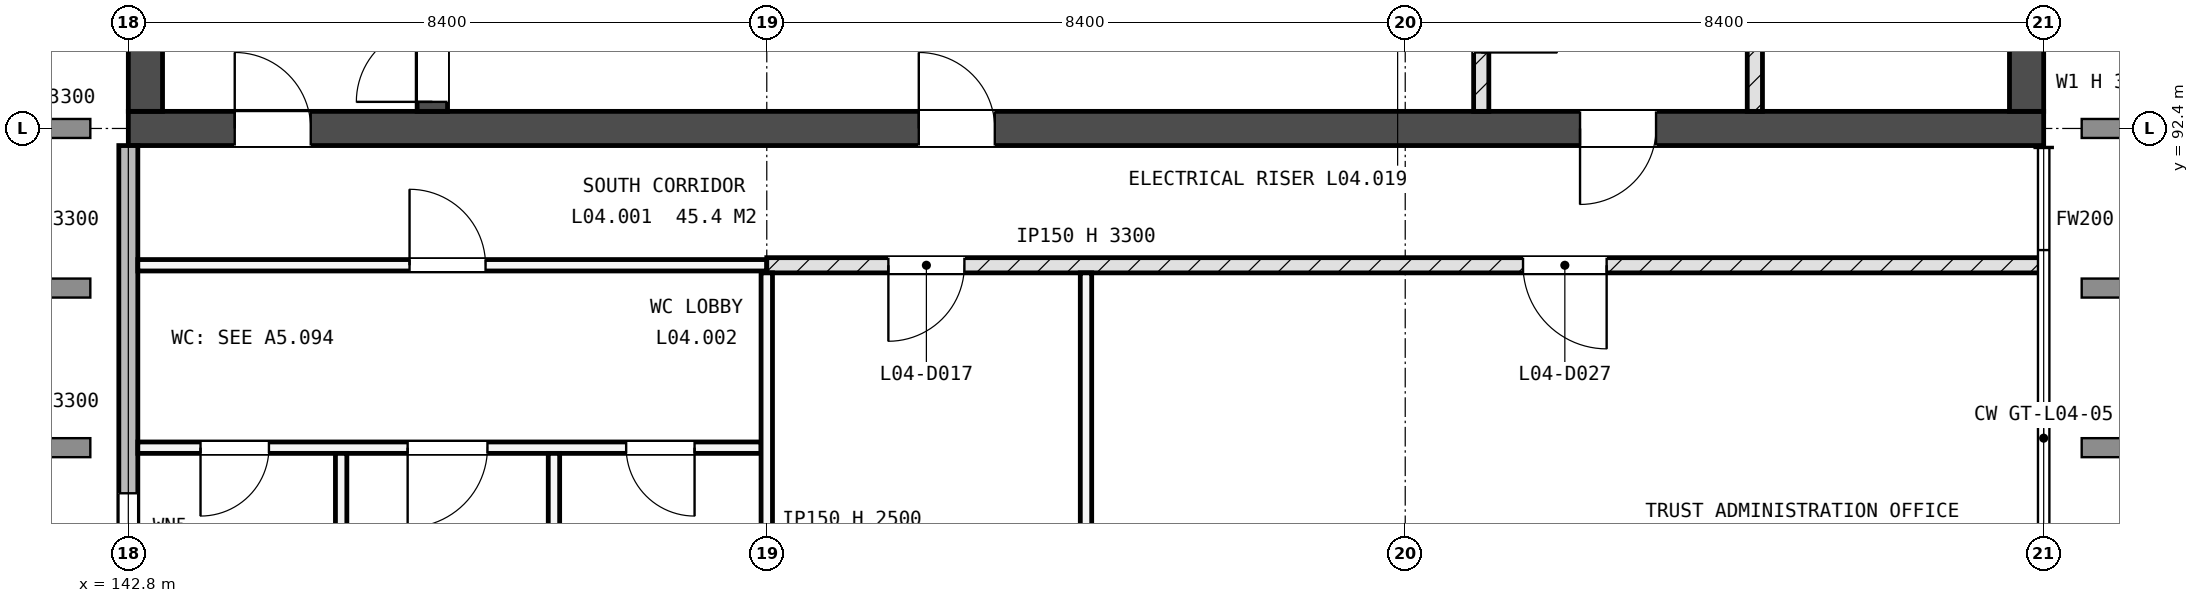
"""IFC4 building model, lengths in metres.
Left out: names, types, materials, properties, quantities, classifications, styles, units other than length and angle.
Written with IfcOpenShell. Run it as: python <this file> out.ifc"""

import sys

from ifc_helpers import new_model, si_unit, direction, frame, frame_2d, origin, place, context, subcontext, project, spatial, rectangle, extrude, element, fill, save


model = new_model("IFC4")
c1 = context("Model", 3, precision=1e-05, world=origin(), true_north=direction((0.0, 1.0)))
c2 = subcontext(c1, "Body", "Model", "MODEL_VIEW")
j1 = project(units=[si_unit("LENGTHUNIT", "METRE"), si_unit("PLANEANGLEUNIT", "RADIAN")], contexts=[c1])
p1 = place(None, origin())
s1 = spatial("IfcSite", under=j1, at=p1, CompositionType="ELEMENT")
p2 = place(p1, origin())
s2 = spatial("IfcBuilding", under=s1, at=p2, CompositionType="ELEMENT")
p3 = place(p2, frame((0.0, 0.0, 18.0)))
s3 = spatial("IfcBuildingStorey", under=s2, at=p3, CompositionType="ELEMENT", Elevation=18.0)
p4 = place(p3, frame((142.8, 92.4, -0.25), z_axis=(0.0, 0.0, 1.0), x_axis=(1.0, 0.0, 0.0)))
e1 = element("IfcWall", 1, at=p4, inside=s3, PredefinedType="SHEAR", context=c2, shape_type="SweptSolid", body=[
    extrude(rectangle(XDim=25.2, YDim=0.45, at=frame_2d((12.6, 0.0))), origin(), (0.0, 0.0, 1.0), 3.6),
])
p5 = place(p4, frame((1.4, 0.0, 0.25)))
e2 = element("IfcOpeningElement", 2, at=p5, cuts=e1, PredefinedType="OPENING", context=c2, shape_type="SweptSolid", body=[
    extrude(rectangle(XDim=1.0, YDim=2.1, at=frame_2d((0.5, 1.05))), frame((0.0, 0.235, 0.0), z_axis=(0.0, -1.0, 0.0), x_axis=(1.0, 0.0, 0.0)), (0.0, 0.0, 1.0), 0.47),
])
p6 = place(p4, frame((19.1, 0.0, 0.25)))
e3 = element("IfcOpeningElement", 3, at=p6, cuts=e1, PredefinedType="OPENING", context=c2, shape_type="SweptSolid", body=[
    extrude(rectangle(XDim=1.0, YDim=2.1, at=frame_2d((0.5, 1.05))), frame((0.0, 0.235, 0.0), z_axis=(0.0, -1.0, 0.0), x_axis=(1.0, 0.0, 0.0)), (0.0, 0.0, 1.0), 0.47),
])
p7 = place(p4, frame((10.4, 0.0, 0.25)))
e4 = element("IfcOpeningElement", 4, at=p7, cuts=e1, PredefinedType="OPENING", context=c2, shape_type="SweptSolid", body=[
    extrude(rectangle(XDim=1.0, YDim=2.1, at=frame_2d((0.5, 1.05))), frame((0.0, 0.235, 0.0), z_axis=(0.0, -1.0, 0.0), x_axis=(1.0, 0.0, 0.0)), (0.0, 0.0, 1.0), 0.47),
])
p8 = place(p3, frame((143.025, 92.625, -0.25), z_axis=(0.0, 0.0, 1.0), x_axis=(0.0, 1.0, 0.0)))
e5 = element("IfcWall", 5, at=p8, inside=s3, PredefinedType="SHEAR", context=c2, shape_type="SweptSolid", body=[
    extrude(rectangle(XDim=16.35, YDim=0.45, at=frame_2d((8.175, 0.0))), origin(), (0.0, 0.0, 1.0), 3.6),
])
p9 = place(p8, frame((2.975, 0.0, 1.85)))
e6 = element("IfcOpeningElement", 6, at=p9, cuts=e5, PredefinedType="OPENING", context=c2, shape_type="SweptSolid", body=[
    extrude(rectangle(XDim=1.2, YDim=0.9, at=frame_2d((0.6, 0.45))), frame((0.0, 0.235, 0.0), z_axis=(0.0, -1.0, 0.0), x_axis=(1.0, 0.0, 0.0)), (0.0, 0.0, 1.0), 0.47),
])
p10 = place(p3, frame((167.775, 92.625, -0.25), z_axis=(0.0, 0.0, 1.0), x_axis=(0.0, 1.0, 0.0)))
e7 = element("IfcWall", 7, at=p10, inside=s3, PredefinedType="SHEAR", context=c2, shape_type="SweptSolid", body=[
    extrude(rectangle(XDim=16.35, YDim=0.45, at=frame_2d((8.175, 0.0))), origin(), (0.0, 0.0, 1.0), 3.6),
])
p11 = place(p10, frame((12.175, 0.0, 1.85)))
e8 = element("IfcOpeningElement", 8, at=p11, cuts=e7, PredefinedType="OPENING", context=c2, shape_type="SweptSolid", body=[
    extrude(rectangle(XDim=1.2, YDim=0.9, at=frame_2d((0.6, 0.45))), frame((0.0, 0.235, 0.0), z_axis=(0.0, -1.0, 0.0), x_axis=(1.0, 0.0, 0.0)), (0.0, 0.0, 1.0), 0.47),
])
p12 = place(p3, frame((146.8, 92.625, -0.25), z_axis=(0.0, 0.0, 1.0), x_axis=(0.0, 1.0, 0.0)))
e9 = element("IfcWall", 9, at=p12, inside=s3, PredefinedType="SHEAR", context=c2, shape_type="SweptSolid", body=[
    extrude(rectangle(XDim=7.5, YDim=0.4, at=frame_2d((3.75, 0.0))), origin(), (0.0, 0.0, 1.0), 3.6),
])
p13 = place(p12, frame((0.125, 0.0, 0.25)))
e10 = element("IfcOpeningElement", 10, at=p13, cuts=e9, PredefinedType="OPENING", context=c2, shape_type="SweptSolid", body=[
    extrude(rectangle(XDim=1.0, YDim=2.1, at=frame_2d((0.5, 1.05))), frame((0.0, 0.21, 0.0), z_axis=(0.0, -1.0, 0.0), x_axis=(1.0, 0.0, 0.0)), (0.0, 0.0, 1.0), 0.42),
])
p14 = place(p3, frame((142.8, 84.5, 0.0), z_axis=(0.0, 0.0, 1.0), x_axis=(0.0, 1.0, 0.0)))
e11 = element("IfcWall", 11, at=p14, inside=s3, PredefinedType="STANDARD", context=c2, shape_type="SweptSolid", body=[
    extrude(rectangle(XDim=7.675, YDim=0.25, at=frame_2d((3.837, 0.0))), origin(), (0.0, 0.0, 1.0), 3.3),
])
p15 = place(p14, frame((2.2, 0.0, 2.1)))
e12 = element("IfcOpeningElement", 12, at=p15, cuts=e11, PredefinedType="OPENING", context=c2, shape_type="SweptSolid", body=[
    extrude(rectangle(XDim=0.9, YDim=0.6, at=frame_2d((0.45, 0.3))), frame((0.0, 0.135, 0.0), z_axis=(0.0, -1.0, 0.0), x_axis=(1.0, 0.0, 0.0)), (0.0, 0.0, 1.0), 0.27),
])
p16 = place(p3, frame((142.925, 88.2, 0.0), z_axis=(0.0, 0.0, 1.0), x_axis=(1.0, 0.0, 0.0)))
e13 = element("IfcWall", 13, at=p16, inside=s3, PredefinedType="PARTITIONING", context=c2, shape_type="SweptSolid", body=[
    extrude(rectangle(XDim=8.2, YDim=0.15, at=frame_2d((4.1, 0.0))), origin(), (0.0, 0.0, 1.0), 3.3),
])
p17 = place(p16, frame((0.825, 0.0, 0.0)))
e14 = element("IfcOpeningElement", 14, at=p17, cuts=e13, PredefinedType="OPENING", context=c2, shape_type="SweptSolid", body=[
    extrude(rectangle(XDim=0.9, YDim=2.1, at=frame_2d((0.45, 1.05))), frame((0.0, 0.085, 0.0), z_axis=(0.0, -1.0, 0.0), x_axis=(1.0, 0.0, 0.0)), (0.0, 0.0, 1.0), 0.17),
])
p18 = place(p16, frame((3.55, 0.0, 0.0)))
e15 = element("IfcOpeningElement", 15, at=p18, cuts=e13, PredefinedType="OPENING", context=c2, shape_type="SweptSolid", body=[
    extrude(rectangle(XDim=1.05, YDim=2.25, at=frame_2d((0.525, 1.125))), frame((0.0, 0.085, 0.0), z_axis=(0.0, -1.0, 0.0), x_axis=(1.0, 0.0, 0.0)), (0.0, 0.0, 1.0), 0.17),
])
p19 = place(p16, frame((6.425, 0.0, 0.0)))
e16 = element("IfcOpeningElement", 16, at=p19, cuts=e13, PredefinedType="OPENING", context=c2, shape_type="SweptSolid", body=[
    extrude(rectangle(XDim=0.9, YDim=2.1, at=frame_2d((0.45, 1.05))), frame((0.0, 0.085, 0.0), z_axis=(0.0, -1.0, 0.0), x_axis=(1.0, 0.0, 0.0)), (0.0, 0.0, 1.0), 0.17),
])
p20 = place(p3, frame((142.925, 90.6, 0.0), z_axis=(0.0, 0.0, 1.0), x_axis=(1.0, 0.0, 0.0)))
e17 = element("IfcWall", 17, at=p20, inside=s3, PredefinedType="PARTITIONING", context=c2, shape_type="SweptSolid", body=[
    extrude(rectangle(XDim=8.275, YDim=0.15, at=frame_2d((4.137, 0.0))), origin(), (0.0, 0.0, 1.0), 3.3),
])
p21 = place(p20, frame((3.575, 0.0, 0.0)))
e18 = element("IfcOpeningElement", 18, at=p21, cuts=e17, PredefinedType="OPENING", context=c2, shape_type="SweptSolid", body=[
    extrude(rectangle(XDim=1.0, YDim=2.1, at=frame_2d((0.5, 1.05))), frame((0.0, 0.085, 0.0), z_axis=(0.0, -1.0, 0.0), x_axis=(1.0, 0.0, 0.0)), (0.0, 0.0, 1.0), 0.17),
])
p22 = place(p3, frame((151.2, 90.6, 0.0), z_axis=(0.0, 0.0, 1.0), x_axis=(1.0, 0.0, 0.0)))
e19 = element("IfcWall", 19, at=p22, inside=s3, PredefinedType="SOLIDWALL", context=c2, shape_type="SweptSolid", body=[
    extrude(rectangle(XDim=16.8, YDim=0.2, at=frame_2d((8.4, 0.0))), origin(), (0.0, 0.0, 1.0), 3.3),
])
p23 = place(p22, frame((1.6, 0.0, 0.0)))
e20 = element("IfcOpeningElement", 20, at=p23, cuts=e19, PredefinedType="OPENING", context=c2, shape_type="SweptSolid", body=[
    extrude(rectangle(XDim=1.0, YDim=2.1, at=frame_2d((0.5, 1.05))), frame((0.0, 0.11, 0.0), z_axis=(0.0, -1.0, 0.0), x_axis=(1.0, 0.0, 0.0)), (0.0, 0.0, 1.0), 0.22),
])
p24 = place(p22, frame((9.95, 0.0, 0.0)))
e21 = element("IfcOpeningElement", 21, at=p24, cuts=e19, PredefinedType="OPENING", context=c2, shape_type="SweptSolid", body=[
    extrude(rectangle(XDim=1.1, YDim=2.25, at=frame_2d((0.55, 1.125))), frame((0.0, 0.11, 0.0), z_axis=(0.0, -1.0, 0.0), x_axis=(1.0, 0.0, 0.0)), (0.0, 0.0, 1.0), 0.22),
])
for number, where, z_axis, x_axis in (
    (22, (145.6, 84.125, 0.0), (0.0, 0.0, 1.0), (0.0, 1.0, 0.0)),
    (23, (148.4, 84.125, 0.0), (0.0, 0.0, 1.0), (0.0, 1.0, 0.0)),
):
    element("IfcWall", number, at=place(p3, frame(where, z_axis=z_axis, x_axis=x_axis)), inside=s3, PredefinedType="PARTITIONING", context=c2, shape_type="SweptSolid", body=[
        extrude(rectangle(XDim=4.0, YDim=0.15, at=frame_2d((2.0, 0.0))), origin(), (0.0, 0.0, 1.0), 3.3),
    ])
p25 = place(p3, frame((151.2, 84.0, 0.0), z_axis=(0.0, 0.0, 1.0), x_axis=(0.0, 1.0, 0.0)))
e24 = element("IfcWall", 24, at=p25, inside=s3, PredefinedType="PARTITIONING", context=c2, shape_type="SweptSolid", body=[
    extrude(rectangle(XDim=6.5, YDim=0.15, at=frame_2d((3.25, 0.0))), origin(), (0.0, 0.0, 1.0), 2.5),
])
p26 = place(p3, frame((155.4, 84.0, 0.0), z_axis=(0.0, 0.0, 1.0), x_axis=(0.0, 1.0, 0.0)))
e25 = element("IfcWall", 25, at=p26, inside=s3, PredefinedType="PARTITIONING", context=c2, shape_type="SweptSolid", body=[
    extrude(rectangle(XDim=6.5, YDim=0.15, at=frame_2d((3.25, 0.0))), origin(), (0.0, 0.0, 1.0), 3.3),
])
p27 = place(p3, frame((160.6, 92.625, 0.0), z_axis=(0.0, 0.0, 1.0), x_axis=(0.0, 1.0, 0.0)))
e26 = element("IfcWall", 26, at=p27, inside=s3, PredefinedType="SOLIDWALL", context=c2, shape_type="SweptSolid", body=[
    extrude(rectangle(XDim=12.475, YDim=0.2, at=frame_2d((6.238, 0.0))), origin(), (0.0, 0.0, 1.0), 3.3),
])
p28 = place(p27, frame((5.075, 0.0, 0.0)))
e27 = element("IfcOpeningElement", 27, at=p28, cuts=e26, PredefinedType="OPENING", context=c2, shape_type="SweptSolid", body=[
    extrude(rectangle(XDim=0.8, YDim=2.1, at=frame_2d((0.4, 1.05))), frame((0.0, 0.11, 0.0), z_axis=(0.0, -1.0, 0.0), x_axis=(1.0, 0.0, 0.0)), (0.0, 0.0, 1.0), 0.22),
])
p29 = place(p27, frame((0.775, 0.0, 0.0)))
e28 = element("IfcOpeningElement", 28, at=p29, cuts=e26, PredefinedType="OPENING", context=c2, shape_type="SweptSolid", body=[
    extrude(rectangle(XDim=1.0, YDim=2.1, at=frame_2d((0.5, 1.05))), frame((0.0, 0.11, 0.0), z_axis=(0.0, -1.0, 0.0), x_axis=(1.0, 0.0, 0.0)), (0.0, 0.0, 1.0), 0.22),
])
p30 = place(p3, frame((164.2, 92.625, 0.0), z_axis=(0.0, 0.0, 1.0), x_axis=(0.0, 1.0, 0.0)))
e29 = element("IfcWall", 29, at=p30, inside=s3, PredefinedType="SOLIDWALL", context=c2, shape_type="SweptSolid", body=[
    extrude(rectangle(XDim=8.725, YDim=0.2, at=frame_2d((4.363, 0.0))), origin(), (0.0, 0.0, 1.0), 3.3),
])
p31 = place(p30, frame((1.675, 0.0, 0.0)))
e30 = element("IfcOpeningElement", 30, at=p31, cuts=e29, PredefinedType="OPENING", context=c2, shape_type="SweptSolid", body=[
    extrude(rectangle(XDim=0.8, YDim=2.1, at=frame_2d((0.4, 1.05))), frame((0.0, 0.11, 0.0), z_axis=(0.0, -1.0, 0.0), x_axis=(1.0, 0.0, 0.0)), (0.0, 0.0, 1.0), 0.22),
])
p32 = place(p30, frame((6.275, 0.0, 0.0)))
e31 = element("IfcOpeningElement", 31, at=p32, cuts=e29, PredefinedType="OPENING", context=c2, shape_type="SweptSolid", body=[
    extrude(rectangle(XDim=0.8, YDim=2.1, at=frame_2d((0.4, 1.05))), frame((0.0, 0.11, 0.0), z_axis=(0.0, -1.0, 0.0), x_axis=(1.0, 0.0, 0.0)), (0.0, 0.0, 1.0), 0.22),
])
p33 = place(p15, origin())
e32 = element("IfcWindow", 32, at=p33, inside=s3, PartitioningType="SINGLE_PANEL", PredefinedType="WINDOW", context=c2, shape_type="SweptSolid", body=[
    extrude(rectangle(XDim=0.9, YDim=0.6, at=frame_2d((0.45, 0.3))), frame((0.0, 0.03, 0.0), z_axis=(0.0, -1.0, 0.0), x_axis=(1.0, 0.0, 0.0)), (0.0, 0.0, 1.0), 0.06),
])
fill(e12, e32)
p34 = place(p5, origin())
e33 = element("IfcDoor", 33, at=p34, inside=s3, OperationType="SINGLE_SWING_RIGHT", PredefinedType="DOOR", context=c2, shape_type="SweptSolid", body=[
    extrude(rectangle(XDim=1.0, YDim=2.1, at=frame_2d((0.5, 1.05))), frame((0.0, 0.025, 0.0), z_axis=(0.0, -1.0, 0.0), x_axis=(1.0, 0.0, 0.0)), (0.0, 0.0, 1.0), 0.05),
])
fill(e2, e33)
p35 = place(p13, origin())
e34 = element("IfcDoor", 34, at=p35, inside=s3, OperationType="SINGLE_SWING_RIGHT", PredefinedType="DOOR", context=c2, shape_type="SweptSolid", body=[
    extrude(rectangle(XDim=1.0, YDim=2.1, at=frame_2d((0.5, 1.05))), frame((0.0, 0.025, 0.0), z_axis=(0.0, -1.0, 0.0), x_axis=(1.0, 0.0, 0.0)), (0.0, 0.0, 1.0), 0.05),
])
fill(e10, e34)
p36 = place(p17, origin())
e35 = element("IfcDoor", 35, at=p36, inside=s3, OperationType="SINGLE_SWING_LEFT", PredefinedType="DOOR", context=c2, shape_type="SweptSolid", body=[
    extrude(rectangle(XDim=0.9, YDim=2.1, at=frame_2d((0.45, 1.05))), frame((0.0, 0.025, 0.0), z_axis=(0.0, -1.0, 0.0), x_axis=(1.0, 0.0, 0.0)), (0.0, 0.0, 1.0), 0.05),
])
fill(e14, e35)
p37 = place(p18, origin())
e36 = element("IfcDoor", 36, at=p37, inside=s3, OperationType="SINGLE_SWING_LEFT", PredefinedType="DOOR", context=c2, shape_type="SweptSolid", body=[
    extrude(rectangle(XDim=1.05, YDim=2.25, at=frame_2d((0.525, 1.125))), frame((0.0, 0.025, 0.0), z_axis=(0.0, -1.0, 0.0), x_axis=(1.0, 0.0, 0.0)), (0.0, 0.0, 1.0), 0.05),
])
fill(e15, e36)
p38 = place(p19, origin())
e37 = element("IfcDoor", 37, at=p38, inside=s3, OperationType="SINGLE_SWING_RIGHT", PredefinedType="DOOR", context=c2, shape_type="SweptSolid", body=[
    extrude(rectangle(XDim=0.9, YDim=2.1, at=frame_2d((0.45, 1.05))), frame((0.0, 0.025, 0.0), z_axis=(0.0, -1.0, 0.0), x_axis=(1.0, 0.0, 0.0)), (0.0, 0.0, 1.0), 0.05),
])
fill(e16, e37)
p39 = place(p23, origin())
e38 = element("IfcDoor", 38, at=p39, inside=s3, OperationType="SINGLE_SWING_LEFT", PredefinedType="DOOR", context=c2, shape_type="SweptSolid", body=[
    extrude(rectangle(XDim=1.0, YDim=2.1, at=frame_2d((0.5, 1.05))), frame((0.0, 0.025, 0.0), z_axis=(0.0, -1.0, 0.0), x_axis=(1.0, 0.0, 0.0)), (0.0, 0.0, 1.0), 0.05),
])
fill(e20, e38)
p40 = place(p24, origin())
e39 = element("IfcDoor", 39, at=p40, inside=s3, OperationType="SINGLE_SWING_RIGHT", PredefinedType="DOOR", context=c2, shape_type="SweptSolid", body=[
    extrude(rectangle(XDim=1.1, YDim=2.25, at=frame_2d((0.55, 1.125))), frame((0.0, 0.025, 0.0), z_axis=(0.0, -1.0, 0.0), x_axis=(1.0, 0.0, 0.0)), (0.0, 0.0, 1.0), 0.05),
])
fill(e21, e39)
p41 = place(p21, origin())
e40 = element("IfcDoor", 40, at=p41, inside=s3, OperationType="SINGLE_SWING_RIGHT", PredefinedType="DOOR", context=c2, shape_type="SweptSolid", body=[
    extrude(rectangle(XDim=1.0, YDim=2.1, at=frame_2d((0.5, 1.05))), frame((0.0, 0.025, 0.0), z_axis=(0.0, -1.0, 0.0), x_axis=(1.0, 0.0, 0.0)), (0.0, 0.0, 1.0), 0.05),
])
fill(e18, e40)
p42 = place(p6, origin())
e41 = element("IfcDoor", 41, at=p42, inside=s3, OperationType="SINGLE_SWING_LEFT", PredefinedType="DOOR", context=c2, shape_type="SweptSolid", body=[
    extrude(rectangle(XDim=1.0, YDim=2.1, at=frame_2d((0.5, 1.05))), frame((0.0, 0.025, 0.0), z_axis=(0.0, -1.0, 0.0), x_axis=(1.0, 0.0, 0.0)), (0.0, 0.0, 1.0), 0.05),
])
fill(e3, e41)
p43 = place(p7, origin())
e42 = element("IfcDoor", 42, at=p43, inside=s3, OperationType="SINGLE_SWING_RIGHT", PredefinedType="DOOR", context=c2, shape_type="SweptSolid", body=[
    extrude(rectangle(XDim=1.0, YDim=2.1, at=frame_2d((0.5, 1.05))), frame((0.0, 0.025, 0.0), z_axis=(0.0, -1.0, 0.0), x_axis=(1.0, 0.0, 0.0)), (0.0, 0.0, 1.0), 0.05),
])
fill(e4, e42)
save(model, sys.argv[1])
